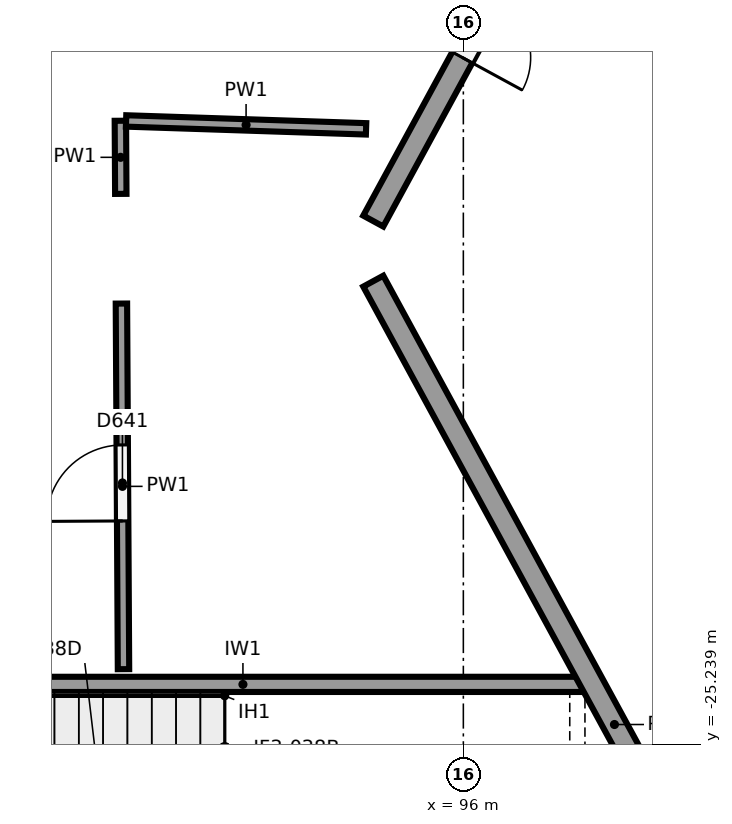
"""IFC4 building model, lengths in metres.
Left out: names, types, materials, properties, quantities, classifications, styles, units other than length and angle.
Written with IfcOpenShell. Run it as: python <this file> out.ifc"""

import sys

from ifc_helpers import new_model, si_unit, direction, frame, frame_2d, origin, origin_2d, place, context, subcontext, project, spatial, rectangle, circle, extrude, element, fill, save


model = new_model("IFC4")
c1 = context("Model", 3, precision=1e-05, world=origin(), true_north=direction((0.0, 1.0)))
c2 = subcontext(c1, "Body", "Model", "MODEL_VIEW")
j1 = project(units=[si_unit("LENGTHUNIT", "METRE"), si_unit("PLANEANGLEUNIT", "RADIAN")], contexts=[c1])
p1 = place(None, origin())
s1 = spatial("IfcSite", under=j1, at=p1, CompositionType="ELEMENT")
p2 = place(p1, origin())
s2 = spatial("IfcBuilding", under=s1, at=p2, CompositionType="ELEMENT")
p3 = place(p2, frame((0.0, 0.0, 6.5)))
s3 = spatial("IfcBuildingStorey", under=s2, at=p3, CompositionType="ELEMENT", Elevation=6.5)
p4 = place(p3, frame((94.6, -18.75, 0.0), z_axis=(0.0, 0.0, 1.0), x_axis=(1.0, 0.0, 0.0)))
e1 = element("IfcColumn", 1, at=p4, inside=s3, PredefinedType="COLUMN", context=c2, shape_type="SweptSolid", body=[
    extrude(circle(Radius=0.45, at=origin_2d()), origin(), (0.0, 0.0, 1.0), 5.5),
])
p5 = place(p3, frame((98.6, -18.75, 0.0), z_axis=(0.0, 0.0, 1.0), x_axis=(1.0, 0.0, 0.0)))
e2 = element("IfcColumn", 2, at=p5, inside=s3, PredefinedType="COLUMN", context=c2, shape_type="SweptSolid", body=[
    extrude(circle(Radius=0.4, at=origin_2d()), origin(), (0.0, 0.0, 1.0), 5.5),
])
p6 = place(p3, frame((94.815, -19.145, 0.0), z_axis=(0.0, 0.0, 1.0), x_axis=(0.477867771117, -0.878431780691, 0.0)))
e3 = element("IfcWall", 3, at=p6, inside=s3, PredefinedType="SOLIDWALL", context=c2, shape_type="SweptSolid", body=[
    extrude(rectangle(XDim=13.28, YDim=0.3, at=frame_2d((6.64, 0.0))), origin(), (0.0, 0.0, 1.0), 3.85),
])
p7 = place(p3, frame((101.161, -6.689, 0.0), z_axis=(0.0, 0.0, 1.0), x_axis=(-0.477867771117, -0.878431780691, 0.0)))
e4 = element("IfcWall", 4, at=p7, inside=s3, PredefinedType="SOLIDWALL", context=c2, shape_type="SweptSolid", body=[
    extrude(rectangle(XDim=13.28, YDim=0.3, at=frame_2d((6.64, 0.0))), origin(), (0.0, 0.0, 1.0), 3.85),
])
p8 = place(p7, frame((9.03, 0.0, 0.0)))
e5 = element("IfcOpeningElement", 5, at=p8, cuts=e4, PredefinedType="OPENING", context=c2, shape_type="SweptSolid", body=[
    extrude(rectangle(XDim=1.8, YDim=2.4, at=frame_2d((0.9, 1.2))), frame((0.0, 0.16, 0.0), z_axis=(0.0, -1.0, 0.0), x_axis=(1.0, 0.0, 0.0)), (0.0, 0.0, 1.0), 0.32),
])
p9 = place(p3, frame((97.6, -24.45, 0.0), z_axis=(0.0, 0.0, 1.0), x_axis=(-1.0, 0.0, 0.0)))
e6 = element("IfcWall", 6, at=p9, inside=s3, PredefinedType="SHEAR", context=c2, shape_type="SweptSolid", body=[
    extrude(rectangle(XDim=9.0, YDim=0.2, at=frame_2d((4.5, 0.0))), origin(), (0.0, 0.0, 1.0), 5.15),
])
p10 = place(p3, frame((97.5, -31.15, 0.0), z_axis=(0.0, 0.0, 1.0), x_axis=(0.0, 1.0, 0.0)))
e7 = element("IfcWall", 7, at=p10, inside=s3, PredefinedType="SHEAR", context=c2, shape_type="SweptSolid", body=[
    extrude(rectangle(XDim=6.6, YDim=0.2, at=frame_2d((3.3, 0.0))), origin(), (0.0, 0.0, 1.0), 5.15),
])
p11 = place(p3, frame((91.529, -24.25, 0.0), z_axis=(0.0, 0.0, 1.0), x_axis=(-0.00568461021, 0.999983842473, 0.0)))
e8 = element("IfcWall", 8, at=p11, inside=s3, PredefinedType="PARTITIONING", context=c2, shape_type="SweptSolid", body=[
    extrude(rectangle(XDim=4.81, YDim=0.15, at=frame_2d((2.405, 0.0))), origin(), (0.0, 0.0, 1.0), 5.15),
])
p12 = place(p11, frame((1.95, 0.0, 0.0)))
e9 = element("IfcOpeningElement", 9, at=p12, cuts=e8, PredefinedType="OPENING", context=c2, shape_type="SweptSolid", body=[
    extrude(rectangle(XDim=1.0, YDim=2.1, at=frame_2d((0.5, 1.05))), frame((0.0, 0.085, 0.0), z_axis=(0.0, -1.0, 0.0), x_axis=(1.0, 0.0, 0.0)), (0.0, 0.0, 1.0), 0.17),
])
p13 = place(p3, frame((91.493, -17.997, 0.0), z_axis=(0.0, 0.0, 1.0), x_axis=(-0.00558225253, 0.999984419107, 0.0)))
e10 = element("IfcWall", 10, at=p13, inside=s3, PredefinedType="PARTITIONING", context=c2, shape_type="SweptSolid", body=[
    extrude(rectangle(XDim=0.962, YDim=0.15, at=frame_2d((0.481, 0.0))), origin(), (0.0, 0.0, 1.0), 5.15),
])
p14 = place(p3, frame((91.562, -17.037, 0.0), z_axis=(0.0, 0.0, 1.0), x_axis=(0.999458119876, -0.032916054045, 0.0)))
e11 = element("IfcWall", 11, at=p14, inside=s3, PredefinedType="PARTITIONING", context=c2, shape_type="SweptSolid", body=[
    extrude(rectangle(XDim=3.16, YDim=0.15, at=frame_2d((1.58, 0.0))), origin(), (0.0, 0.0, 1.0), 5.15),
])
p15 = place(p8, origin())
e12 = element("IfcDoor", 12, at=p15, inside=s3, OperationType="DOUBLE_DOOR_SINGLE_SWING", PredefinedType="DOOR", context=c2, shape_type="SweptSolid", body=[
    extrude(rectangle(XDim=1.8, YDim=2.4, at=frame_2d((0.9, 1.2))), frame((0.0, 0.025, 0.0), z_axis=(0.0, -1.0, 0.0), x_axis=(1.0, 0.0, 0.0)), (0.0, 0.0, 1.0), 0.05),
])
fill(e5, e12)
p16 = place(p12, origin())
e13 = element("IfcDoor", 13, at=p16, inside=s3, OperationType="SINGLE_SWING_LEFT", PredefinedType="DOOR", context=c2, shape_type="SweptSolid", body=[
    extrude(rectangle(XDim=1.0, YDim=2.1, at=frame_2d((0.5, 1.05))), frame((0.0, 0.025, 0.0), z_axis=(0.0, -1.0, 0.0), x_axis=(1.0, 0.0, 0.0)), (0.0, 0.0, 1.0), 0.05),
])
fill(e9, e13)
save(model, sys.argv[1])
